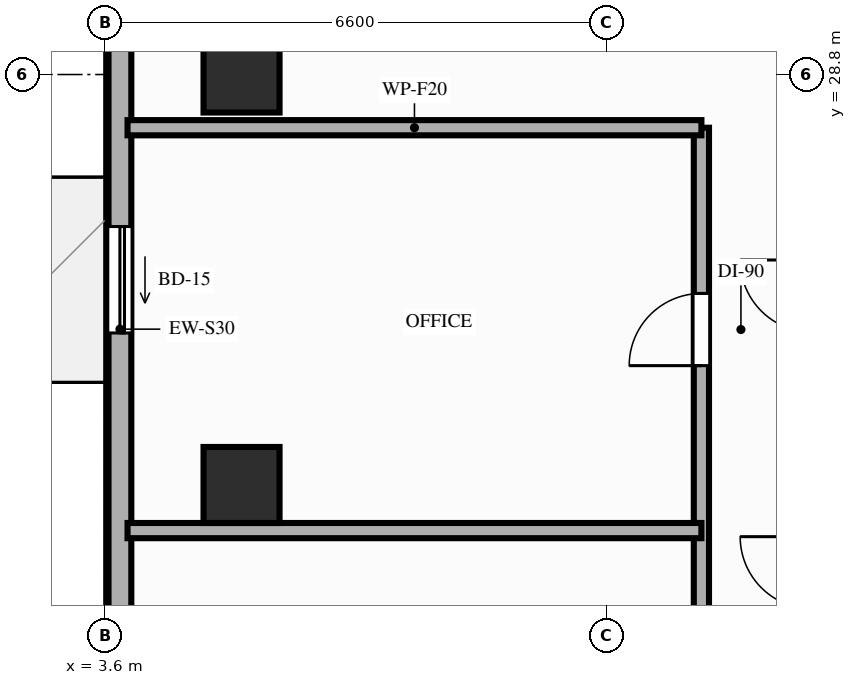
"""IFC4 building model, lengths in metres.
Left out: names, types, materials, properties, quantities, classifications, styles, units other than length and angle.
Written with IfcOpenShell. Run it as: python <this file> out.ifc"""

import sys

from ifc_helpers import new_model, si_unit, direction, frame, frame_2d, origin, origin_2d, place, context, subcontext, project, spatial, rectangle, extrude, element, fill, save


model = new_model("IFC4")
c1 = context("Model", 3, precision=1e-05, world=origin(), true_north=direction((0.0, 1.0)))
c2 = subcontext(c1, "Body", "Model", "MODEL_VIEW")
j1 = project(units=[si_unit("LENGTHUNIT", "METRE"), si_unit("PLANEANGLEUNIT", "RADIAN")], contexts=[c1])
p1 = place(None, origin())
s1 = spatial("IfcSite", under=j1, at=p1, CompositionType="ELEMENT")
p2 = place(p1, origin())
s2 = spatial("IfcBuilding", under=s1, at=p2, CompositionType="ELEMENT")
p3 = place(p2, frame((0.0, 0.0, 107.4)))
s3 = spatial("IfcBuildingStorey", under=s2, at=p3, CompositionType="ELEMENT", Elevation=107.4)
for number, where, z_axis, x_axis in (
    (1, (5.4, 23.4, 0.0), (0.0, 0.0, 1.0), (1.0, 0.0, 0.0)),
    (2, (5.4, 28.8, 0.0), (0.0, 0.0, 1.0), (1.0, 0.0, 0.0)),
):
    element("IfcColumn", number, at=place(p3, frame(where, z_axis=z_axis, x_axis=x_axis)), inside=s3, PredefinedType="COLUMN", context=c2, shape_type="SweptSolid", body=[
        extrude(rectangle(XDim=1.0, YDim=1.0, at=origin_2d()), origin(), (0.0, 0.0, 1.0), 3.2),
    ])
p4 = place(p3, frame((3.8, 42.1, 0.0), z_axis=(0.0, 0.0, 1.0), x_axis=(0.0, -1.0, 0.0)))
e3 = element("IfcWall", 3, at=p4, inside=s3, PredefinedType="STANDARD", context=c2, shape_type="SweptSolid", body=[
    extrude(rectangle(XDim=33.3, YDim=0.3, at=frame_2d((16.65, 0.0))), origin(), (0.0, 0.0, 1.0), 2.71),
])
p5 = place(p4, frame((25.47, 0.0, 0.0)))
e4 = element("IfcOpeningElement", 4, at=p5, cuts=e3, PredefinedType="OPENING", context=c2, shape_type="SweptSolid", body=[
    extrude(rectangle(XDim=1.4, YDim=2.1, at=frame_2d((0.7, 1.05))), frame((0.0, 0.16, 0.0), z_axis=(0.0, -1.0, 0.0), x_axis=(1.0, 0.0, 0.0)), (0.0, 0.0, 1.0), 0.32),
])
p6 = place(p4, frame((15.3, 0.0, 0.0)))
e5 = element("IfcOpeningElement", 5, at=p6, cuts=e3, PredefinedType="OPENING", context=c2, shape_type="SweptSolid", body=[
    extrude(rectangle(XDim=1.4, YDim=2.1, at=frame_2d((0.7, 1.05))), frame((0.0, 0.16, 0.0), z_axis=(0.0, -1.0, 0.0), x_axis=(1.0, 0.0, 0.0)), (0.0, 0.0, 1.0), 0.32),
])
p7 = place(p4, frame((29.48, 0.0, 0.85)))
e6 = element("IfcOpeningElement", 6, at=p7, cuts=e3, PredefinedType="OPENING", context=c2, shape_type="SweptSolid", body=[
    extrude(rectangle(XDim=1.8, YDim=1.61, at=frame_2d((0.9, 0.805))), frame((0.0, 0.16, 0.0), z_axis=(0.0, -1.0, 0.0), x_axis=(1.0, 0.0, 0.0)), (0.0, 0.0, 1.0), 0.32),
])
p8 = place(p4, frame((20.5, 0.0, 0.85)))
e7 = element("IfcOpeningElement", 7, at=p8, cuts=e3, PredefinedType="OPENING", context=c2, shape_type="SweptSolid", body=[
    extrude(rectangle(XDim=1.8, YDim=1.61, at=frame_2d((0.9, 0.805))), frame((0.0, 0.16, 0.0), z_axis=(0.0, -1.0, 0.0), x_axis=(1.0, 0.0, 0.0)), (0.0, 0.0, 1.0), 0.32),
])
p9 = place(p4, frame((9.9, 0.0, 0.85)))
e8 = element("IfcOpeningElement", 8, at=p9, cuts=e3, PredefinedType="OPENING", context=c2, shape_type="SweptSolid", body=[
    extrude(rectangle(XDim=1.8, YDim=1.61, at=frame_2d((0.9, 0.805))), frame((0.0, 0.16, 0.0), z_axis=(0.0, -1.0, 0.0), x_axis=(1.0, 0.0, 0.0)), (0.0, 0.0, 1.0), 0.32),
])
p10 = place(p4, frame((3.8, 0.0, 0.85)))
e9 = element("IfcOpeningElement", 9, at=p10, cuts=e3, PredefinedType="OPENING", context=c2, shape_type="SweptSolid", body=[
    extrude(rectangle(XDim=1.8, YDim=1.61, at=frame_2d((0.9, 0.805))), frame((0.0, 0.16, 0.0), z_axis=(0.0, -1.0, 0.0), x_axis=(1.0, 0.0, 0.0)), (0.0, 0.0, 1.0), 0.32),
])
p11 = place(p3, frame((11.45, 14.5, 0.0), z_axis=(0.0, 0.0, 1.0), x_axis=(0.0, 1.0, 0.0)))
e10 = element("IfcWall", 10, at=p11, inside=s3, PredefinedType="PARTITIONING", context=c2, shape_type="SweptSolid", body=[
    extrude(rectangle(XDim=13.6, YDim=0.2, at=frame_2d((6.8, 0.0))), origin(), (0.0, 0.0, 1.0), 2.41),
])
p12 = place(p11, frame((2.33, 0.0, 0.0)))
e11 = element("IfcOpeningElement", 11, at=p12, cuts=e10, PredefinedType="OPENING", context=c2, shape_type="SweptSolid", body=[
    extrude(rectangle(XDim=0.95, YDim=2.15, at=frame_2d((0.475, 1.075))), frame((0.0, 0.11, 0.0), z_axis=(0.0, -1.0, 0.0), x_axis=(1.0, 0.0, 0.0)), (0.0, 0.0, 1.0), 0.22),
])
p13 = place(p11, frame((5.5, 0.0, 0.0)))
e12 = element("IfcOpeningElement", 12, at=p13, cuts=e10, PredefinedType="OPENING", context=c2, shape_type="SweptSolid", body=[
    extrude(rectangle(XDim=0.95, YDim=2.15, at=frame_2d((0.475, 1.075))), frame((0.0, 0.11, 0.0), z_axis=(0.0, -1.0, 0.0), x_axis=(1.0, 0.0, 0.0)), (0.0, 0.0, 1.0), 0.22),
])
p14 = place(p11, frame((10.47, 0.0, 0.0)))
e13 = element("IfcOpeningElement", 13, at=p14, cuts=e10, PredefinedType="OPENING", context=c2, shape_type="SweptSolid", body=[
    extrude(rectangle(XDim=0.95, YDim=2.15, at=frame_2d((0.475, 1.075))), frame((0.0, 0.11, 0.0), z_axis=(0.0, -1.0, 0.0), x_axis=(1.0, 0.0, 0.0)), (0.0, 0.0, 1.0), 0.22),
])
for number, where, z_axis, x_axis in (
    (14, (3.9, 28.1, 0.0), (0.0, 0.0, 1.0), (1.0, 0.0, 0.0)),
    (15, (3.9, 22.8, 0.0), (0.0, 0.0, 1.0), (1.0, 0.0, 0.0)),
):
    element("IfcWall", number, at=place(p3, frame(where, z_axis=z_axis, x_axis=x_axis)), inside=s3, PredefinedType="PARTITIONING", context=c2, shape_type="SweptSolid", body=[
        extrude(rectangle(XDim=7.55, YDim=0.2, at=frame_2d((3.775, 0.0))), origin(), (0.0, 0.0, 1.0), 2.41),
    ])
p15 = place(p6, origin())
e16 = element("IfcDoor", 16, at=p15, inside=s3, OperationType="SLIDING_TO_RIGHT", PredefinedType="DOOR", context=c2, shape_type="SweptSolid", body=[
    extrude(rectangle(XDim=1.4, YDim=2.1, at=frame_2d((0.7, 1.05))), frame((0.0, 0.025, 0.0), z_axis=(0.0, -1.0, 0.0), x_axis=(1.0, 0.0, 0.0)), (0.0, 0.0, 1.0), 0.05),
])
fill(e5, e16)
p16 = place(p14, origin())
e17 = element("IfcDoor", 17, at=p16, inside=s3, OperationType="SINGLE_SWING_LEFT", PredefinedType="DOOR", context=c2, shape_type="SweptSolid", body=[
    extrude(rectangle(XDim=0.95, YDim=2.15, at=frame_2d((0.475, 1.075))), frame((0.0, 0.025, 0.0), z_axis=(0.0, -1.0, 0.0), x_axis=(1.0, 0.0, 0.0)), (0.0, 0.0, 1.0), 0.05),
])
fill(e13, e17)
save(model, sys.argv[1])
